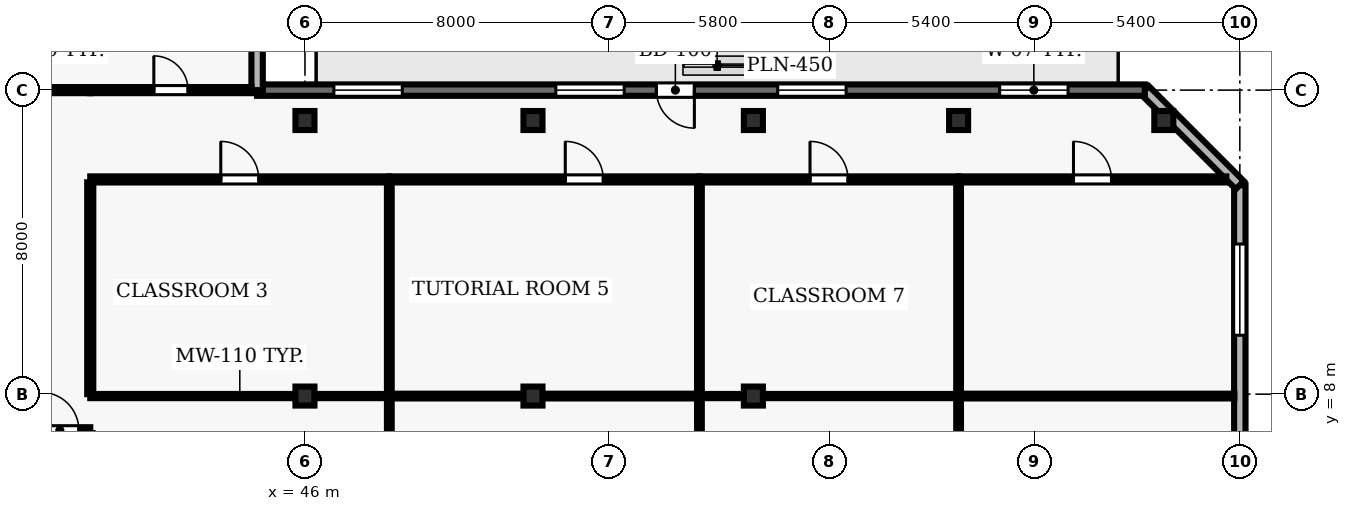
"""IFC4 building model, lengths in metres.
Left out: names, types, materials, properties, quantities, classifications, styles, units other than length and angle.
Written with IfcOpenShell. Run it as: python <this file> out.ifc"""

import sys

from ifc_helpers import new_model, si_unit, direction, frame, frame_2d, origin, origin_2d, place, context, subcontext, project, spatial, rectangle, hollow_rectangle, extrude, element, fill, save


model = new_model("IFC4")
c1 = context("Model", 3, precision=1e-05, world=origin(), true_north=direction((0.0, 1.0)))
c2 = subcontext(c1, "Body", "Model", "MODEL_VIEW")
j1 = project(units=[si_unit("LENGTHUNIT", "METRE"), si_unit("PLANEANGLEUNIT", "RADIAN")], contexts=[c1])
p1 = place(None, origin())
s1 = spatial("IfcSite", under=j1, at=p1, CompositionType="ELEMENT")
p2 = place(p1, origin())
s2 = spatial("IfcBuilding", under=s1, at=p2, CompositionType="ELEMENT")
p3 = place(p2, frame((0.0, 0.0, 158.0)))
s3 = spatial("IfcBuildingStorey", under=s2, at=p3, CompositionType="ELEMENT", Elevation=158.0)
for number, where, z_axis, x_axis in (
    (1, (46.0, 7.95, 0.0), (0.0, 0.0, 1.0), (1.0, 0.0, 0.0)),
    (2, (46.0, 15.2, 0.0), (0.0, 0.0, 1.0), (1.0, 0.0, 0.0)),
    (3, (52.0, 7.95, 0.0), (0.0, 0.0, 1.0), (1.0, 0.0, 0.0)),
    (4, (52.0, 15.2, 0.0), (0.0, 0.0, 1.0), (1.0, 0.0, 0.0)),
    (5, (57.8, 7.95, 0.0), (0.0, 0.0, 1.0), (1.0, 0.0, 0.0)),
    (6, (57.8, 15.2, 0.0), (0.0, 0.0, 1.0), (1.0, 0.0, 0.0)),
    (7, (63.2, 15.2, 0.0), (0.0, 0.0, 1.0), (1.0, 0.0, 0.0)),
    (8, (68.6, 15.2, 0.0), (0.0, 0.0, 1.0), (1.0, 0.0, 0.0)),
):
    element("IfcColumn", number, at=place(p3, frame(where, z_axis=z_axis, x_axis=x_axis)), inside=s3, PredefinedType="COLUMN", context=c2, shape_type="SweptSolid", body=[
        extrude(hollow_rectangle(XDim=0.5, YDim=0.5, WallThickness=0.025, at=origin_2d()), origin(), (0.0, 0.0, 1.0), 3.9),
    ])
p4 = place(p3, frame((70.6, 2.5, 0.0), z_axis=(0.0, 0.0, 1.0), x_axis=(0.0, 1.0, 0.0)))
e9 = element("IfcWall", 9, at=p4, inside=s3, PredefinedType="SOLIDWALL", context=c2, shape_type="SweptSolid", body=[
    extrude(rectangle(XDim=11.0, YDim=0.3, at=frame_2d((5.5, 0.0))), origin(), (0.0, 0.0, 1.0), 3.69),
])
p5 = place(p4, frame((1.55, 0.0, 0.9)))
e10 = element("IfcOpeningElement", 10, at=p5, cuts=e9, PredefinedType="OPENING", context=c2, shape_type="SweptSolid", body=[
    extrude(rectangle(XDim=2.4, YDim=1.6, at=frame_2d((1.2, 0.8))), frame((0.0, 0.16, 0.0), z_axis=(0.0, -1.0, 0.0), x_axis=(1.0, 0.0, 0.0)), (0.0, 0.0, 1.0), 0.32),
])
p6 = place(p4, frame((7.05, 0.0, 0.9)))
e11 = element("IfcOpeningElement", 11, at=p6, cuts=e9, PredefinedType="OPENING", context=c2, shape_type="SweptSolid", body=[
    extrude(rectangle(XDim=2.4, YDim=1.6, at=frame_2d((1.2, 0.8))), frame((0.0, 0.16, 0.0), z_axis=(0.0, -1.0, 0.0), x_axis=(1.0, 0.0, 0.0)), (0.0, 0.0, 1.0), 0.32),
])
p7 = place(p3, frame((70.6, 13.5, 0.0), z_axis=(0.0, 0.0, 1.0), x_axis=(-0.707106781187, 0.707106781187, 0.0)))
e12 = element("IfcWall", 12, at=p7, inside=s3, PredefinedType="SOLIDWALL", context=c2, shape_type="SweptSolid", body=[
    extrude(rectangle(XDim=3.536, YDim=0.3, at=frame_2d((1.768, 0.0))), origin(), (0.0, 0.0, 1.0), 3.69),
])
p8 = place(p3, frame((68.1, 16.0, 0.0), z_axis=(0.0, 0.0, 1.0), x_axis=(-1.0, 0.0, 0.0)))
e13 = element("IfcWall", 13, at=p8, inside=s3, PredefinedType="SOLIDWALL", context=c2, shape_type="SweptSolid", body=[
    extrude(rectangle(XDim=23.359, YDim=0.3, at=frame_2d((11.68, 0.0))), origin(), (0.0, 0.0, 1.0), 3.69),
])
p9 = place(p8, frame((11.853, 0.0, 0.0)))
e14 = element("IfcOpeningElement", 14, at=p9, cuts=e13, PredefinedType="OPENING", context=c2, shape_type="SweptSolid", body=[
    extrude(rectangle(XDim=1.0, YDim=2.2, at=frame_2d((0.5, 1.1))), frame((0.0, 0.16, 0.0), z_axis=(0.0, -1.0, 0.0), x_axis=(1.0, 0.0, 0.0)), (0.0, 0.0, 1.0), 0.32),
])
p10 = place(p8, frame((2.02, 0.0, 0.9)))
e15 = element("IfcOpeningElement", 15, at=p10, cuts=e13, PredefinedType="OPENING", context=c2, shape_type="SweptSolid", body=[
    extrude(rectangle(XDim=1.8, YDim=1.8, at=frame_2d((0.9, 0.9))), frame((0.0, 0.16, 0.0), z_axis=(0.0, -1.0, 0.0), x_axis=(1.0, 0.0, 0.0)), (0.0, 0.0, 1.0), 0.32),
])
p11 = place(p8, frame((7.86, 0.0, 0.9)))
e16 = element("IfcOpeningElement", 16, at=p11, cuts=e13, PredefinedType="OPENING", context=c2, shape_type="SweptSolid", body=[
    extrude(rectangle(XDim=1.8, YDim=1.8, at=frame_2d((0.9, 0.9))), frame((0.0, 0.16, 0.0), z_axis=(0.0, -1.0, 0.0), x_axis=(1.0, 0.0, 0.0)), (0.0, 0.0, 1.0), 0.32),
])
p12 = place(p8, frame((13.699, 0.0, 0.9)))
e17 = element("IfcOpeningElement", 17, at=p12, cuts=e13, PredefinedType="OPENING", context=c2, shape_type="SweptSolid", body=[
    extrude(rectangle(XDim=1.8, YDim=1.8, at=frame_2d((0.9, 0.9))), frame((0.0, 0.16, 0.0), z_axis=(0.0, -1.0, 0.0), x_axis=(1.0, 0.0, 0.0)), (0.0, 0.0, 1.0), 0.32),
])
p13 = place(p8, frame((19.539, 0.0, 0.9)))
e18 = element("IfcOpeningElement", 18, at=p13, cuts=e13, PredefinedType="OPENING", context=c2, shape_type="SweptSolid", body=[
    extrude(rectangle(XDim=1.8, YDim=1.8, at=frame_2d((0.9, 0.9))), frame((0.0, 0.16, 0.0), z_axis=(0.0, -1.0, 0.0), x_axis=(1.0, 0.0, 0.0)), (0.0, 0.0, 1.0), 0.32),
])
p14 = place(p3, frame((44.741, 16.0, 0.0), z_axis=(0.0, 0.0, 1.0), x_axis=(0.0, 1.0, 0.0)))
e19 = element("IfcWall", 19, at=p14, inside=s3, PredefinedType="SOLIDWALL", context=c2, shape_type="SweptSolid", body=[
    extrude(rectangle(XDim=4.9, YDim=0.3, at=frame_2d((2.45, 0.0))), origin(), (0.0, 0.0, 1.0), 3.69),
])
p15 = place(p3, frame((38.05, 7.05, 0.0), z_axis=(0.0, 0.0, 1.0), x_axis=(1.0, 0.0, 0.0)))
e20 = element("IfcWall", 20, at=p15, inside=s3, PredefinedType="PARTITIONING", context=c2, shape_type="SweptSolid", body=[
    extrude(rectangle(XDim=2.3, YDim=0.16, at=frame_2d((1.15, 0.0))), origin(), (0.0, 0.0, 1.0), 3.69),
])
p16 = place(p15, frame((1.0, 0.0, 0.0)))
e21 = element("IfcOpeningElement", 21, at=p16, cuts=e20, PredefinedType="OPENING", context=c2, shape_type="SweptSolid", body=[
    extrude(rectangle(XDim=1.0, YDim=2.1, at=frame_2d((0.5, 1.05))), frame((0.0, 0.09, 0.0), z_axis=(0.0, -1.0, 0.0), x_axis=(1.0, 0.0, 0.0)), (0.0, 0.0, 1.0), 0.18),
])
p17 = place(p3, frame((40.35, 13.65, 0.0), z_axis=(0.0, 0.0, 1.0), x_axis=(1.0, 0.0, 0.0)))
e22 = element("IfcWall", 22, at=p17, inside=s3, PredefinedType="PARTITIONING", context=c2, shape_type="SweptSolid", body=[
    extrude(rectangle(XDim=7.87, YDim=0.16, at=frame_2d((3.935, 0.0))), origin(), (0.0, 0.0, 1.0), 3.69),
])
p18 = place(p17, frame((3.435, 0.0, 0.0)))
e23 = element("IfcOpeningElement", 23, at=p18, cuts=e22, PredefinedType="OPENING", context=c2, shape_type="SweptSolid", body=[
    extrude(rectangle(XDim=1.0, YDim=2.1, at=frame_2d((0.5, 1.05))), frame((0.0, 0.09, 0.0), z_axis=(0.0, -1.0, 0.0), x_axis=(1.0, 0.0, 0.0)), (0.0, 0.0, 1.0), 0.18),
])
p19 = place(p3, frame((40.35, 16.0, 0.0), z_axis=(0.0, 0.0, 1.0), x_axis=(-1.0, 0.0, 0.0)))
e24 = element("IfcWall", 24, at=p19, inside=s3, PredefinedType="PARTITIONING", context=c2, shape_type="SweptSolid", body=[
    extrude(rectangle(XDim=2.3, YDim=0.16, at=frame_2d((1.15, 0.0))), origin(), (0.0, 0.0, 1.0), 3.39),
])
p20 = place(p3, frame((40.35, 16.0, 0.0), z_axis=(0.0, 0.0, 1.0), x_axis=(1.0, 0.0, 0.0)))
e25 = element("IfcWall", 25, at=p20, inside=s3, PredefinedType="PARTITIONING", context=c2, shape_type="SweptSolid", body=[
    extrude(rectangle(XDim=4.246, YDim=0.16, at=frame_2d((2.123, 0.0))), origin(), (0.0, 0.0, 1.0), 3.39),
])
p21 = place(p20, frame((1.673, 0.0, 0.0)))
e26 = element("IfcOpeningElement", 26, at=p21, cuts=e25, PredefinedType="OPENING", context=c2, shape_type="SweptSolid", body=[
    extrude(rectangle(XDim=0.9, YDim=2.1, at=frame_2d((0.45, 1.05))), frame((0.0, 0.09, 0.0), z_axis=(0.0, -1.0, 0.0), x_axis=(1.0, 0.0, 0.0)), (0.0, 0.0, 1.0), 0.18),
])
p22 = place(p3, frame((48.22, 7.95, 0.0), z_axis=(0.0, 0.0, 1.0), x_axis=(-1.0, 0.0, 0.0)))
e27 = element("IfcWall", 27, at=p22, inside=s3, PredefinedType="MOVABLE", context=c2, shape_type="SweptSolid", body=[
    extrude(rectangle(XDim=7.87, YDim=0.11, at=frame_2d((3.935, 0.0))), origin(), (0.0, 0.0, 1.0), 3.074),
])
p23 = place(p3, frame((48.22, 13.65, 0.0), z_axis=(0.0, 0.0, 1.0), x_axis=(1.0, 0.0, 0.0)))
e28 = element("IfcWall", 28, at=p23, inside=s3, PredefinedType="PARTITIONING", context=c2, shape_type="SweptSolid", body=[
    extrude(rectangle(XDim=8.16, YDim=0.16, at=frame_2d((4.08, 0.0))), origin(), (0.0, 0.0, 1.0), 3.69),
])
p24 = place(p23, frame((4.63, 0.0, 0.0)))
e29 = element("IfcOpeningElement", 29, at=p24, cuts=e28, PredefinedType="OPENING", context=c2, shape_type="SweptSolid", body=[
    extrude(rectangle(XDim=1.0, YDim=2.1, at=frame_2d((0.5, 1.05))), frame((0.0, 0.09, 0.0), z_axis=(0.0, -1.0, 0.0), x_axis=(1.0, 0.0, 0.0)), (0.0, 0.0, 1.0), 0.18),
])
p25 = place(p3, frame((56.38, 7.95, 0.0), z_axis=(0.0, 0.0, 1.0), x_axis=(-1.0, 0.0, 0.0)))
e30 = element("IfcWall", 30, at=p25, inside=s3, PredefinedType="PARTITIONING", context=c2, shape_type="SweptSolid", body=[
    extrude(rectangle(XDim=8.16, YDim=0.125, at=frame_2d((4.08, 0.0))), origin(), (0.0, 0.0, 1.0), 3.074),
])
p26 = place(p3, frame((56.38, 13.65, 0.0), z_axis=(0.0, 0.0, 1.0), x_axis=(1.0, 0.0, 0.0)))
e31 = element("IfcWall", 31, at=p26, inside=s3, PredefinedType="PARTITIONING", context=c2, shape_type="SweptSolid", body=[
    extrude(rectangle(XDim=6.82, YDim=0.16, at=frame_2d((3.41, 0.0))), origin(), (0.0, 0.0, 1.0), 3.69),
])
p27 = place(p26, frame((2.91, 0.0, 0.0)))
e32 = element("IfcOpeningElement", 32, at=p27, cuts=e31, PredefinedType="OPENING", context=c2, shape_type="SweptSolid", body=[
    extrude(rectangle(XDim=1.0, YDim=2.1, at=frame_2d((0.5, 1.05))), frame((0.0, 0.09, 0.0), z_axis=(0.0, -1.0, 0.0), x_axis=(1.0, 0.0, 0.0)), (0.0, 0.0, 1.0), 0.18),
])
p28 = place(p3, frame((63.2, 7.95, 0.0), z_axis=(0.0, 0.0, 1.0), x_axis=(-1.0, 0.0, 0.0)))
e33 = element("IfcWall", 33, at=p28, inside=s3, PredefinedType="MOVABLE", context=c2, shape_type="SweptSolid", body=[
    extrude(rectangle(XDim=6.82, YDim=0.11, at=frame_2d((3.41, 0.0))), origin(), (0.0, 0.0, 1.0), 3.074),
])
p29 = place(p3, frame((63.2, 13.65, 0.0), z_axis=(0.0, 0.0, 1.0), x_axis=(1.0, 0.0, 0.0)))
e34 = element("IfcWall", 34, at=p29, inside=s3, PredefinedType="PARTITIONING", context=c2, shape_type="SweptSolid", body=[
    extrude(rectangle(XDim=7.045, YDim=0.16, at=frame_2d((3.522, 0.0))), origin(), (0.0, 0.0, 1.0), 3.69),
])
p30 = place(p29, frame((3.023, 0.0, 0.0)))
e35 = element("IfcOpeningElement", 35, at=p30, cuts=e34, PredefinedType="OPENING", context=c2, shape_type="SweptSolid", body=[
    extrude(rectangle(XDim=1.0, YDim=2.1, at=frame_2d((0.5, 1.05))), frame((0.0, 0.09, 0.0), z_axis=(0.0, -1.0, 0.0), x_axis=(1.0, 0.0, 0.0)), (0.0, 0.0, 1.0), 0.18),
])
p31 = place(p3, frame((70.455, 7.95, 0.0), z_axis=(0.0, 0.0, 1.0), x_axis=(-1.0, 0.0, 0.0)))
e36 = element("IfcWall", 36, at=p31, inside=s3, PredefinedType="PARTITIONING", context=c2, shape_type="SweptSolid", body=[
    extrude(rectangle(XDim=7.255, YDim=0.125, at=frame_2d((3.627, 0.0))), origin(), (0.0, 0.0, 1.0), 3.69),
])
p32 = place(p3, frame((40.35, 8.0, 0.0), z_axis=(0.0, 0.0, 1.0), x_axis=(0.0, 1.0, 0.0)))
e37 = element("IfcWall", 37, at=p32, inside=s3, PredefinedType="PARTITIONING", context=c2, shape_type="SweptSolid", body=[
    extrude(rectangle(XDim=5.575, YDim=0.16, at=frame_2d((2.788, 0.0))), origin(), (0.0, 0.0, 1.0), 3.69),
])
p33 = place(p3, frame((48.22, 0.145, 0.0), z_axis=(0.0, 0.0, 1.0), x_axis=(0.0, 1.0, 0.0)))
e38 = element("IfcWall", 38, at=p33, inside=s3, PredefinedType="PARTITIONING", context=c2, shape_type="SweptSolid", body=[
    extrude(rectangle(XDim=7.748, YDim=0.125, at=frame_2d((3.874, 0.0))), origin(), (0.0, 0.0, 1.0), 3.69),
])
p34 = place(p33, frame((3.424, 0.0, 0.0)))
e39 = element("IfcOpeningElement", 39, at=p34, cuts=e38, PredefinedType="OPENING", context=c2, shape_type="SweptSolid", body=[
    extrude(rectangle(XDim=0.9, YDim=2.1, at=frame_2d((0.45, 1.05))), frame((0.0, 0.073, 0.0), z_axis=(0.0, -1.0, 0.0), x_axis=(1.0, 0.0, 0.0)), (0.0, 0.0, 1.0), 0.145),
])
p35 = place(p3, frame((48.22, 8.008, 0.0), z_axis=(0.0, 0.0, 1.0), x_axis=(0.0, 1.0, 0.0)))
e40 = element("IfcWall", 40, at=p35, inside=s3, PredefinedType="PARTITIONING", context=c2, shape_type="SweptSolid", body=[
    extrude(rectangle(XDim=5.567, YDim=0.125, at=frame_2d((2.783, 0.0))), origin(), (0.0, 0.0, 1.0), 3.69),
])
p36 = place(p3, frame((56.38, 0.145, 0.0), z_axis=(0.0, 0.0, 1.0), x_axis=(0.0, 1.0, 0.0)))
e41 = element("IfcWall", 41, at=p36, inside=s3, PredefinedType="PARTITIONING", context=c2, shape_type="SweptSolid", body=[
    extrude(rectangle(XDim=7.748, YDim=0.125, at=frame_2d((3.874, 0.0))), origin(), (0.0, 0.0, 1.0), 3.69),
])
p37 = place(p36, frame((3.424, 0.0, 0.0)))
e42 = element("IfcOpeningElement", 42, at=p37, cuts=e41, PredefinedType="OPENING", context=c2, shape_type="SweptSolid", body=[
    extrude(rectangle(XDim=0.9, YDim=2.1, at=frame_2d((0.45, 1.05))), frame((0.0, 0.073, 0.0), z_axis=(0.0, -1.0, 0.0), x_axis=(1.0, 0.0, 0.0)), (0.0, 0.0, 1.0), 0.145),
])
p38 = place(p3, frame((56.38, 8.008, 0.0), z_axis=(0.0, 0.0, 1.0), x_axis=(0.0, 1.0, 0.0)))
e43 = element("IfcWall", 43, at=p38, inside=s3, PredefinedType="PARTITIONING", context=c2, shape_type="SweptSolid", body=[
    extrude(rectangle(XDim=5.567, YDim=0.125, at=frame_2d((2.783, 0.0))), origin(), (0.0, 0.0, 1.0), 3.69),
])
p39 = place(p3, frame((63.2, 0.145, 0.0), z_axis=(0.0, 0.0, 1.0), x_axis=(0.0, 1.0, 0.0)))
e44 = element("IfcWall", 44, at=p39, inside=s3, PredefinedType="PARTITIONING", context=c2, shape_type="SweptSolid", body=[
    extrude(rectangle(XDim=7.748, YDim=0.125, at=frame_2d((3.874, 0.0))), origin(), (0.0, 0.0, 1.0), 3.074),
])
p40 = place(p39, frame((3.424, 0.0, 0.0)))
e45 = element("IfcOpeningElement", 45, at=p40, cuts=e44, PredefinedType="OPENING", context=c2, shape_type="SweptSolid", body=[
    extrude(rectangle(XDim=0.9, YDim=2.1, at=frame_2d((0.45, 1.05))), frame((0.0, 0.073, 0.0), z_axis=(0.0, -1.0, 0.0), x_axis=(1.0, 0.0, 0.0)), (0.0, 0.0, 1.0), 0.145),
])
p41 = place(p3, frame((63.2, 8.008, 0.0), z_axis=(0.0, 0.0, 1.0), x_axis=(0.0, 1.0, 0.0)))
e46 = element("IfcWall", 46, at=p41, inside=s3, PredefinedType="PARTITIONING", context=c2, shape_type="SweptSolid", body=[
    extrude(rectangle(XDim=5.567, YDim=0.125, at=frame_2d((2.783, 0.0))), origin(), (0.0, 0.0, 1.0), 3.074),
])
p42 = place(p6, origin())
e47 = element("IfcWindow", 47, at=p42, inside=s3, PartitioningType="SINGLE_PANEL", PredefinedType="WINDOW", context=c2, shape_type="SweptSolid", body=[
    extrude(rectangle(XDim=2.4, YDim=1.6, at=frame_2d((1.2, 0.8))), frame((0.0, 0.03, 0.0), z_axis=(0.0, -1.0, 0.0), x_axis=(1.0, 0.0, 0.0)), (0.0, 0.0, 1.0), 0.06),
])
fill(e11, e47)
p43 = place(p9, origin())
e48 = element("IfcDoor", 48, at=p43, inside=s3, OperationType="SINGLE_SWING_LEFT", PredefinedType="DOOR", context=c2, shape_type="SweptSolid", body=[
    extrude(rectangle(XDim=1.0, YDim=2.2, at=frame_2d((0.5, 1.1))), frame((0.0, 0.025, 0.0), z_axis=(0.0, -1.0, 0.0), x_axis=(1.0, 0.0, 0.0)), (0.0, 0.0, 1.0), 0.05),
])
fill(e14, e48)
p44 = place(p10, origin())
e49 = element("IfcWindow", 49, at=p44, inside=s3, PartitioningType="SINGLE_PANEL", PredefinedType="WINDOW", context=c2, shape_type="SweptSolid", body=[
    extrude(rectangle(XDim=1.8, YDim=1.8, at=frame_2d((0.9, 0.9))), frame((0.0, 0.03, 0.0), z_axis=(0.0, -1.0, 0.0), x_axis=(1.0, 0.0, 0.0)), (0.0, 0.0, 1.0), 0.06),
])
fill(e15, e49)
p45 = place(p11, origin())
e50 = element("IfcWindow", 50, at=p45, inside=s3, PartitioningType="SINGLE_PANEL", PredefinedType="WINDOW", context=c2, shape_type="SweptSolid", body=[
    extrude(rectangle(XDim=1.8, YDim=1.8, at=frame_2d((0.9, 0.9))), frame((0.0, 0.03, 0.0), z_axis=(0.0, -1.0, 0.0), x_axis=(1.0, 0.0, 0.0)), (0.0, 0.0, 1.0), 0.06),
])
fill(e16, e50)
p46 = place(p12, origin())
e51 = element("IfcWindow", 51, at=p46, inside=s3, PartitioningType="SINGLE_PANEL", PredefinedType="WINDOW", context=c2, shape_type="SweptSolid", body=[
    extrude(rectangle(XDim=1.8, YDim=1.8, at=frame_2d((0.9, 0.9))), frame((0.0, 0.03, 0.0), z_axis=(0.0, -1.0, 0.0), x_axis=(1.0, 0.0, 0.0)), (0.0, 0.0, 1.0), 0.06),
])
fill(e17, e51)
p47 = place(p13, origin())
e52 = element("IfcWindow", 52, at=p47, inside=s3, PartitioningType="SINGLE_PANEL", PredefinedType="WINDOW", context=c2, shape_type="SweptSolid", body=[
    extrude(rectangle(XDim=1.8, YDim=1.8, at=frame_2d((0.9, 0.9))), frame((0.0, 0.03, 0.0), z_axis=(0.0, -1.0, 0.0), x_axis=(1.0, 0.0, 0.0)), (0.0, 0.0, 1.0), 0.06),
])
fill(e18, e52)
p48 = place(p16, origin())
e53 = element("IfcDoor", 53, at=p48, inside=s3, OperationType="SINGLE_SWING_LEFT", PredefinedType="DOOR", context=c2, shape_type="SweptSolid", body=[
    extrude(rectangle(XDim=1.0, YDim=2.1, at=frame_2d((0.5, 1.05))), frame((0.0, 0.025, 0.0), z_axis=(0.0, -1.0, 0.0), x_axis=(1.0, 0.0, 0.0)), (0.0, 0.0, 1.0), 0.05),
])
fill(e21, e53)
p49 = place(p18, origin())
e54 = element("IfcDoor", 54, at=p49, inside=s3, OperationType="SINGLE_SWING_LEFT", PredefinedType="DOOR", context=c2, shape_type="SweptSolid", body=[
    extrude(rectangle(XDim=1.0, YDim=2.1, at=frame_2d((0.5, 1.05))), frame((0.0, 0.025, 0.0), z_axis=(0.0, -1.0, 0.0), x_axis=(1.0, 0.0, 0.0)), (0.0, 0.0, 1.0), 0.05),
])
fill(e23, e54)
p50 = place(p24, origin())
e55 = element("IfcDoor", 55, at=p50, inside=s3, OperationType="SINGLE_SWING_LEFT", PredefinedType="DOOR", context=c2, shape_type="SweptSolid", body=[
    extrude(rectangle(XDim=1.0, YDim=2.1, at=frame_2d((0.5, 1.05))), frame((0.0, 0.025, 0.0), z_axis=(0.0, -1.0, 0.0), x_axis=(1.0, 0.0, 0.0)), (0.0, 0.0, 1.0), 0.05),
])
fill(e29, e55)
p51 = place(p27, origin())
e56 = element("IfcDoor", 56, at=p51, inside=s3, OperationType="SINGLE_SWING_LEFT", PredefinedType="DOOR", context=c2, shape_type="SweptSolid", body=[
    extrude(rectangle(XDim=1.0, YDim=2.1, at=frame_2d((0.5, 1.05))), frame((0.0, 0.025, 0.0), z_axis=(0.0, -1.0, 0.0), x_axis=(1.0, 0.0, 0.0)), (0.0, 0.0, 1.0), 0.05),
])
fill(e32, e56)
p52 = place(p30, origin())
e57 = element("IfcDoor", 57, at=p52, inside=s3, OperationType="SINGLE_SWING_LEFT", PredefinedType="DOOR", context=c2, shape_type="SweptSolid", body=[
    extrude(rectangle(XDim=1.0, YDim=2.1, at=frame_2d((0.5, 1.05))), frame((0.0, 0.025, 0.0), z_axis=(0.0, -1.0, 0.0), x_axis=(1.0, 0.0, 0.0)), (0.0, 0.0, 1.0), 0.05),
])
fill(e35, e57)
p53 = place(p21, origin())
e58 = element("IfcDoor", 58, at=p53, inside=s3, OperationType="SINGLE_SWING_LEFT", PredefinedType="DOOR", context=c2, shape_type="SweptSolid", body=[
    extrude(rectangle(XDim=0.9, YDim=2.1, at=frame_2d((0.45, 1.05))), frame((0.0, 0.025, 0.0), z_axis=(0.0, -1.0, 0.0), x_axis=(1.0, 0.0, 0.0)), (0.0, 0.0, 1.0), 0.05),
])
fill(e26, e58)
save(model, sys.argv[1])
